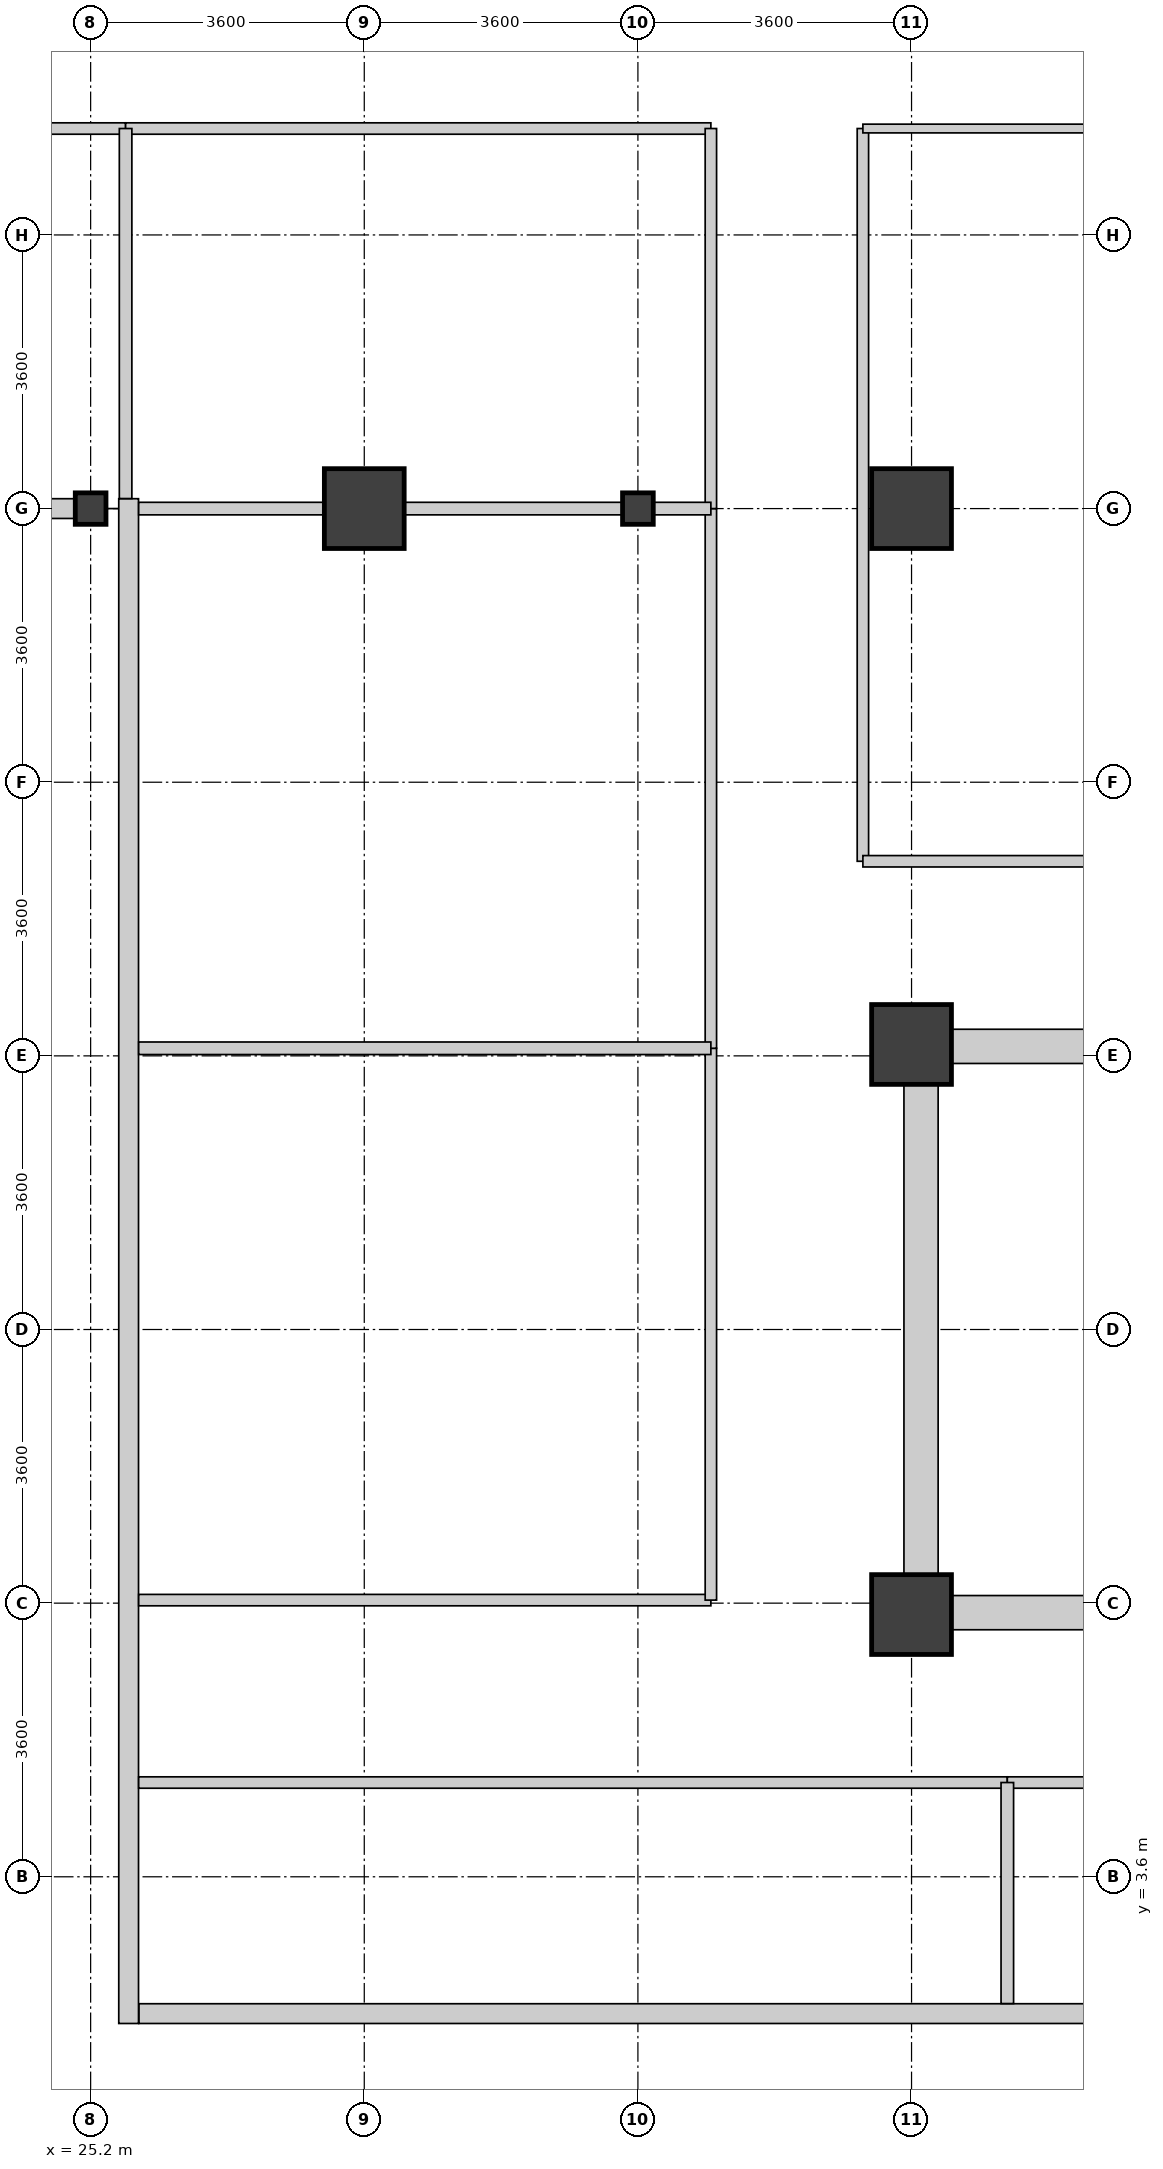
"""IFC4 building model, lengths in metres.
Left out: names, types, materials, properties, quantities, classifications, styles, units other than length and angle.
Written with IfcOpenShell. Run it as: python <this file> out.ifc"""

import sys

from ifc_helpers import new_model, si_unit, direction, frame, frame_2d, origin, origin_2d, place, context, subcontext, project, spatial, rectangle, i_section, extrude, source, transform, mapped, element, fill, save


model = new_model("IFC4")
c1 = context("Model", 3, precision=1e-05, world=origin(), true_north=direction((0.0, 1.0)))
c2 = subcontext(c1, "Body", "Model", "MODEL_VIEW")
j1 = project(units=[si_unit("LENGTHUNIT", "METRE"), si_unit("PLANEANGLEUNIT", "RADIAN")], contexts=[c1])
p1 = place(None, origin())
s1 = spatial("IfcSite", under=j1, at=p1, CompositionType="ELEMENT")
p2 = place(p1, origin())
s2 = spatial("IfcBuilding", under=s1, at=p2, CompositionType="ELEMENT")
p3 = place(p2, frame((0.0, 0.0, 135.6)))
s3 = spatial("IfcBuildingStorey", under=s2, at=p3, CompositionType="ELEMENT", Elevation=135.6)
p4 = place(p3, frame((36.125, 6.85, 0.0), z_axis=(0.0, 0.0, 1.0), x_axis=(0.0, 1.0, 0.0)))
e1 = element("IfcWall", 1, at=p4, inside=s3, PredefinedType="SHEAR", context=c2, shape_type="SweptSolid", body=[
    extrude(rectangle(XDim=7.9, YDim=0.45, at=frame_2d((3.95, 0.0))), origin(), (0.0, 0.0, 1.0), 4.36),
])
for number, where, z_axis, x_axis in (
    (2, (36.35, 7.075, 0.0), (0.0, 0.0, 1.0), (1.0, 0.0, 0.0)),
    (3, (36.35, 14.525, 0.0), (0.0, 0.0, 1.0), (1.0, 0.0, 0.0)),
):
    element("IfcWall", number, at=place(p3, frame(where, z_axis=z_axis, x_axis=x_axis)), inside=s3, PredefinedType="SHEAR", context=c2, shape_type="SweptSolid", body=[
        extrude(rectangle(XDim=3.2, YDim=0.45, at=frame_2d((1.6, 0.0))), origin(), (0.0, 0.0, 1.0), 4.36),
    ])
m1 = source(origin(), c2, "Body", "SweptSolid", [
    extrude(rectangle(XDim=1.05, YDim=1.05, at=origin_2d()), origin(), (0.0, 0.0, 1.0), 4.6),
])
for number, where, z_axis, x_axis in (
    (4, (28.8, 21.6, 0.0), (0.0, 0.0, 1.0), (1.0, 0.0, 0.0)),
    (5, (36.0, 21.6, 0.0), (0.0, 0.0, 1.0), (1.0, 0.0, 0.0)),
    (6, (36.0, 7.05, 0.0), (0.0, 0.0, 1.0), (1.0, 0.0, 0.0)),
    (7, (36.0, 14.55, 0.0), (0.0, 0.0, 1.0), (1.0, 0.0, 0.0)),
):
    element("IfcColumn", number, at=place(p3, frame(where, z_axis=z_axis, x_axis=x_axis)), inside=s3, PredefinedType="COLUMN", context=c2, shape_type="MappedRepresentation", body=[
        mapped(m1, transform((0.0, 0.0, 0.0), x_axis=(1.0, 0.0, 0.0), y_axis=(0.0, 1.0, 0.0), z_axis=(0.0, 0.0, 1.0), scale=1.0)),
    ])
m2 = source(origin(), c2, "Body", "SweptSolid", [
    extrude(i_section(OverallWidth=0.404, OverallDepth=0.414, WebThickness=0.021, FlangeThickness=0.028, FilletRadius=0.015, at=origin_2d()), origin(), (0.0, 0.0, 1.0), 4.6),
])
for number, where, z_axis, x_axis in (
    (8, (25.2, 21.6, 0.0), (0.0, 0.0, 1.0), (1.0, 0.0, 0.0)),
    (9, (32.4, 21.6, 0.0), (0.0, 0.0, 1.0), (1.0, 0.0, 0.0)),
):
    element("IfcColumn", number, at=place(p3, frame(where, z_axis=z_axis, x_axis=x_axis)), inside=s3, PredefinedType="COLUMN", context=c2, shape_type="MappedRepresentation", body=[
        mapped(m2, transform((0.0, 0.0, 0.0), x_axis=(1.0, 0.0, 0.0), y_axis=(0.0, 1.0, 0.0), z_axis=(0.0, 0.0, 1.0), scale=1.0)),
    ])
p5 = place(p3, frame((54.365, 1.8, 0.0), z_axis=(0.0, 0.0, 1.0), x_axis=(-1.0, 0.0, 0.0)))
e10 = element("IfcWall", 10, at=p5, inside=s3, PredefinedType="STANDARD", context=c2, shape_type="SweptSolid", body=[
    extrude(rectangle(XDim=28.53, YDim=0.26, at=frame_2d((14.265, 0.0))), origin(), (0.0, 0.0, 1.0), 4.34),
])
p6 = place(p5, frame((0.433, 0.0, 0.85)))
e11 = element("IfcOpeningElement", 11, at=p6, cuts=e10, PredefinedType="OPENING", context=c2, shape_type="SweptSolid", body=[
    extrude(rectangle(XDim=2.7, YDim=2.05, at=frame_2d((1.35, 1.025))), frame((0.0, 0.14, 0.0), z_axis=(0.0, -1.0, 0.0), x_axis=(1.0, 0.0, 0.0)), (0.0, 0.0, 1.0), 0.28),
])
p7 = place(p5, frame((7.566, 0.0, 0.85)))
e12 = element("IfcOpeningElement", 12, at=p7, cuts=e10, PredefinedType="OPENING", context=c2, shape_type="SweptSolid", body=[
    extrude(rectangle(XDim=2.7, YDim=2.05, at=frame_2d((1.35, 1.025))), frame((0.0, 0.14, 0.0), z_axis=(0.0, -1.0, 0.0), x_axis=(1.0, 0.0, 0.0)), (0.0, 0.0, 1.0), 0.28),
])
p8 = place(p5, frame((11.132, 0.0, 0.85)))
e13 = element("IfcOpeningElement", 13, at=p8, cuts=e10, PredefinedType="OPENING", context=c2, shape_type="SweptSolid", body=[
    extrude(rectangle(XDim=2.7, YDim=2.05, at=frame_2d((1.35, 1.025))), frame((0.0, 0.14, 0.0), z_axis=(0.0, -1.0, 0.0), x_axis=(1.0, 0.0, 0.0)), (0.0, 0.0, 1.0), 0.28),
])
p9 = place(p5, frame((18.264, 0.0, 0.85)))
e14 = element("IfcOpeningElement", 14, at=p9, cuts=e10, PredefinedType="OPENING", context=c2, shape_type="SweptSolid", body=[
    extrude(rectangle(XDim=2.7, YDim=2.05, at=frame_2d((1.35, 1.025))), frame((0.0, 0.14, 0.0), z_axis=(0.0, -1.0, 0.0), x_axis=(1.0, 0.0, 0.0)), (0.0, 0.0, 1.0), 0.28),
])
p10 = place(p5, frame((21.831, 0.0, 0.85)))
e15 = element("IfcOpeningElement", 15, at=p10, cuts=e10, PredefinedType="OPENING", context=c2, shape_type="SweptSolid", body=[
    extrude(rectangle(XDim=2.7, YDim=2.05, at=frame_2d((1.35, 1.025))), frame((0.0, 0.14, 0.0), z_axis=(0.0, -1.0, 0.0), x_axis=(1.0, 0.0, 0.0)), (0.0, 0.0, 1.0), 0.28),
])
p11 = place(p5, frame((25.397, 0.0, 0.85)))
e16 = element("IfcOpeningElement", 16, at=p11, cuts=e10, PredefinedType="OPENING", context=c2, shape_type="SweptSolid", body=[
    extrude(rectangle(XDim=2.7, YDim=2.05, at=frame_2d((1.35, 1.025))), frame((0.0, 0.14, 0.0), z_axis=(0.0, -1.0, 0.0), x_axis=(1.0, 0.0, 0.0)), (0.0, 0.0, 1.0), 0.28),
])
p12 = place(p3, frame((24.997, 21.6, 0.0), z_axis=(0.0, 0.0, 1.0), x_axis=(-1.0, 0.0, 0.0)))
e17 = element("IfcWall", 17, at=p12, inside=s3, PredefinedType="STANDARD", context=c2, shape_type="SweptSolid", body=[
    extrude(rectangle(XDim=2.871, YDim=0.26, at=frame_2d((1.436, 0.0))), origin(), (0.0, 0.0, 1.0), 3.89),
])
p13 = place(p12, frame((0.96, 0.0, 0.85)))
e18 = element("IfcOpeningElement", 18, at=p13, cuts=e17, PredefinedType="OPENING", context=c2, shape_type="SweptSolid", body=[
    extrude(rectangle(XDim=0.95, YDim=1.75, at=frame_2d((0.475, 0.875))), frame((0.0, 0.14, 0.0), z_axis=(0.0, -1.0, 0.0), x_axis=(1.0, 0.0, 0.0)), (0.0, 0.0, 1.0), 0.28),
])
p14 = place(p3, frame((25.7, 1.67, 0.0), z_axis=(0.0, 0.0, 1.0), x_axis=(0.0, 1.0, 0.0)))
e19 = element("IfcWall", 19, at=p14, inside=s3, PredefinedType="STANDARD", context=c2, shape_type="SweptSolid", body=[
    extrude(rectangle(XDim=20.06, YDim=0.26, at=frame_2d((10.03, 0.0))), origin(), (0.0, 0.0, 1.0), 4.34),
])
p15 = place(p14, frame((7.008, 0.0, 0.85)))
e20 = element("IfcOpeningElement", 20, at=p15, cuts=e19, PredefinedType="OPENING", context=c2, shape_type="SweptSolid", body=[
    extrude(rectangle(XDim=2.7, YDim=2.05, at=frame_2d((1.35, 1.025))), frame((0.0, 0.14, 0.0), z_axis=(0.0, -1.0, 0.0), x_axis=(1.0, 0.0, 0.0)), (0.0, 0.0, 1.0), 0.28),
])
p16 = place(p14, frame((13.695, 0.0, 0.85)))
e21 = element("IfcOpeningElement", 21, at=p16, cuts=e19, PredefinedType="OPENING", context=c2, shape_type="SweptSolid", body=[
    extrude(rectangle(XDim=2.7, YDim=2.05, at=frame_2d((1.35, 1.025))), frame((0.0, 0.14, 0.0), z_axis=(0.0, -1.0, 0.0), x_axis=(1.0, 0.0, 0.0)), (0.0, 0.0, 1.0), 0.28),
])
p17 = place(p3, frame((25.832, 4.84, 0.0), z_axis=(0.0, 0.0, 1.0), x_axis=(1.0, 0.0, 0.0)))
e22 = element("IfcWall", 22, at=p17, inside=s3, PredefinedType="PARTITIONING", context=c2, shape_type="SweptSolid", body=[
    extrude(rectangle(XDim=11.428, YDim=0.15, at=frame_2d((5.714, 0.0))), origin(), (0.0, 0.0, 1.0), 4.34),
])
p18 = place(p17, frame((5.064, 0.0, 0.0)))
e23 = element("IfcOpeningElement", 23, at=p18, cuts=e22, PredefinedType="OPENING", context=c2, shape_type="SweptSolid", body=[
    extrude(rectangle(XDim=1.3, YDim=2.12, at=frame_2d((0.65, 1.06))), frame((0.0, 0.085, 0.0), z_axis=(0.0, -1.0, 0.0), x_axis=(1.0, 0.0, 0.0)), (0.0, 0.0, 1.0), 0.17),
])
p19 = place(p3, frame((37.26, 4.84, 0.0), z_axis=(0.0, 0.0, 1.0), x_axis=(1.0, 0.0, 0.0)))
e24 = element("IfcWall", 24, at=p19, inside=s3, PredefinedType="PARTITIONING", context=c2, shape_type="SweptSolid", body=[
    extrude(rectangle(XDim=10.54, YDim=0.15, at=frame_2d((5.27, 0.0))), origin(), (0.0, 0.0, 1.0), 4.34),
])
p20 = place(p19, frame((4.82, 0.0, 0.0)))
e25 = element("IfcOpeningElement", 25, at=p20, cuts=e24, PredefinedType="OPENING", context=c2, shape_type="SweptSolid", body=[
    extrude(rectangle(XDim=0.9, YDim=2.08, at=frame_2d((0.45, 1.04))), frame((0.0, 0.085, 0.0), z_axis=(0.0, -1.0, 0.0), x_axis=(1.0, 0.0, 0.0)), (0.0, 0.0, 1.0), 0.17),
])
p21 = place(p3, frame((35.36, 16.96, 0.0), z_axis=(0.0, 0.0, 1.0), x_axis=(0.0, 1.0, 0.0)))
e26 = element("IfcWall", 26, at=p21, inside=s3, PredefinedType="PARTITIONING", context=c2, shape_type="SweptSolid", body=[
    extrude(rectangle(XDim=9.64, YDim=0.15, at=frame_2d((4.82, 0.0))), origin(), (0.0, 0.0, 1.0), 4.34),
])
p22 = place(p21, frame((2.435, 0.0, 0.0)))
e27 = element("IfcOpeningElement", 27, at=p22, cuts=e26, PredefinedType="OPENING", context=c2, shape_type="SweptSolid", body=[
    extrude(rectangle(XDim=1.3, YDim=2.12, at=frame_2d((0.65, 1.06))), frame((0.0, 0.085, 0.0), z_axis=(0.0, -1.0, 0.0), x_axis=(1.0, 0.0, 0.0)), (0.0, 0.0, 1.0), 0.17),
])
p23 = place(p3, frame((17.4, 26.6, 0.0), z_axis=(0.0, 0.0, 1.0), x_axis=(1.0, 0.0, 0.0)))
e28 = element("IfcWall", 28, at=p23, inside=s3, PredefinedType="PARTITIONING", context=c2, shape_type="SweptSolid", body=[
    extrude(rectangle(XDim=8.26, YDim=0.15, at=frame_2d((4.13, 0.0))), origin(), (0.0, 0.0, 1.0), 4.34),
])
p24 = place(p23, frame((3.655, 0.0, 0.0)))
e29 = element("IfcOpeningElement", 29, at=p24, cuts=e28, PredefinedType="OPENING", context=c2, shape_type="SweptSolid", body=[
    extrude(rectangle(XDim=0.95, YDim=2.1, at=frame_2d((0.475, 1.05))), frame((0.0, 0.085, 0.0), z_axis=(0.0, -1.0, 0.0), x_axis=(1.0, 0.0, 0.0)), (0.0, 0.0, 1.0), 0.17),
])
p25 = place(p3, frame((25.66, 26.6, 0.0), z_axis=(0.0, 0.0, 1.0), x_axis=(1.0, 0.0, 0.0)))
e30 = element("IfcWall", 30, at=p25, inside=s3, PredefinedType="PARTITIONING", context=c2, shape_type="SweptSolid", body=[
    extrude(rectangle(XDim=7.7, YDim=0.15, at=frame_2d((3.85, 0.0))), origin(), (0.0, 0.0, 1.0), 4.34),
])
p26 = place(p25, frame((3.2, 0.0, 0.0)))
e31 = element("IfcOpeningElement", 31, at=p26, cuts=e30, PredefinedType="OPENING", context=c2, shape_type="SweptSolid", body=[
    extrude(rectangle(XDim=1.3, YDim=2.12, at=frame_2d((0.65, 1.06))), frame((0.0, 0.085, 0.0), z_axis=(0.0, -1.0, 0.0), x_axis=(1.0, 0.0, 0.0)), (0.0, 0.0, 1.0), 0.17),
])
p27 = place(p3, frame((25.832, 7.24, 0.0), z_axis=(0.0, 0.0, 1.0), x_axis=(1.0, 0.0, 0.0)))
e32 = element("IfcWall", 32, at=p27, inside=s3, PredefinedType="PARTITIONING", context=c2, shape_type="SweptSolid", body=[
    extrude(rectangle(XDim=7.528, YDim=0.15, at=frame_2d((3.764, 0.0))), origin(), (0.0, 0.0, 1.0), 4.34),
])
p28 = place(p27, frame((3.114, 0.0, 0.0)))
e33 = element("IfcOpeningElement", 33, at=p28, cuts=e32, PredefinedType="OPENING", context=c2, shape_type="SweptSolid", body=[
    extrude(rectangle(XDim=1.3, YDim=2.12, at=frame_2d((0.65, 1.06))), frame((0.0, 0.085, 0.0), z_axis=(0.0, -1.0, 0.0), x_axis=(1.0, 0.0, 0.0)), (0.0, 0.0, 1.0), 0.17),
])
p29 = place(p3, frame((33.36, 7.24, 0.0), z_axis=(0.0, 0.0, 1.0), x_axis=(0.0, 1.0, 0.0)))
e34 = element("IfcWall", 34, at=p29, inside=s3, PredefinedType="PARTITIONING", context=c2, shape_type="SweptSolid", body=[
    extrude(rectangle(XDim=7.26, YDim=0.15, at=frame_2d((3.63, 0.0))), origin(), (0.0, 0.0, 1.0), 4.34),
])
p30 = place(p3, frame((33.36, 14.5, 0.0), z_axis=(0.0, 0.0, 1.0), x_axis=(0.0, 1.0, 0.0)))
e35 = element("IfcWall", 35, at=p30, inside=s3, PredefinedType="PARTITIONING", context=c2, shape_type="SweptSolid", body=[
    extrude(rectangle(XDim=7.1, YDim=0.15, at=frame_2d((3.55, 0.0))), origin(), (0.0, 0.0, 1.0), 4.34),
])
p31 = place(p30, frame((2.9, 0.0, 0.0)))
e36 = element("IfcOpeningElement", 36, at=p31, cuts=e35, PredefinedType="OPENING", context=c2, shape_type="SweptSolid", body=[
    extrude(rectangle(XDim=1.3, YDim=2.12, at=frame_2d((0.65, 1.06))), frame((0.0, 0.085, 0.0), z_axis=(0.0, -1.0, 0.0), x_axis=(1.0, 0.0, 0.0)), (0.0, 0.0, 1.0), 0.17),
])
p32 = place(p3, frame((35.36, 16.96, 0.0), z_axis=(0.0, 0.0, 1.0), x_axis=(1.0, 0.0, 0.0)))
e37 = element("IfcWall", 37, at=p32, inside=s3, PredefinedType="PARTITIONING", context=c2, shape_type="SweptSolid", body=[
    extrude(rectangle(XDim=5.82, YDim=0.15, at=frame_2d((2.91, 0.0))), origin(), (0.0, 0.0, 1.0), 4.34),
])
p33 = place(p3, frame((33.36, 21.6, 0.0), z_axis=(0.0, 0.0, 1.0), x_axis=(0.0, 1.0, 0.0)))
e38 = element("IfcWall", 38, at=p33, inside=s3, PredefinedType="PARTITIONING", context=c2, shape_type="SweptSolid", body=[
    extrude(rectangle(XDim=5.0, YDim=0.15, at=frame_2d((2.5, 0.0))), origin(), (0.0, 0.0, 1.0), 4.34),
])
p34 = place(p3, frame((25.832, 14.5, 0.0), z_axis=(0.0, 0.0, 1.0), x_axis=(1.0, 0.0, 0.0)))
e39 = element("IfcWall", 39, at=p34, inside=s3, PredefinedType="PARTITIONING", context=c2, shape_type="SweptSolid", body=[
    extrude(rectangle(XDim=7.528, YDim=0.165, at=frame_2d((3.764, 0.0))), origin(), (0.0, 0.0, 1.0), 4.34),
])
p35 = place(p3, frame((25.832, 21.6, 0.0), z_axis=(0.0, 0.0, 1.0), x_axis=(1.0, 0.0, 0.0)))
e40 = element("IfcWall", 40, at=p35, inside=s3, PredefinedType="PARTITIONING", context=c2, shape_type="SweptSolid", body=[
    extrude(rectangle(XDim=7.528, YDim=0.165, at=frame_2d((3.764, 0.0))), origin(), (0.0, 0.0, 1.0), 3.89),
])
p36 = place(p3, frame((35.36, 26.6, 0.0), z_axis=(0.0, 0.0, 1.0), x_axis=(1.0, 0.0, 0.0)))
e41 = element("IfcWall", 41, at=p36, inside=s3, PredefinedType="PARTITIONING", context=c2, shape_type="SweptSolid", body=[
    extrude(rectangle(XDim=5.82, YDim=0.115, at=frame_2d((2.91, 0.0))), origin(), (0.0, 0.0, 1.0), 4.34),
])
p37 = place(p3, frame((25.66, 21.732, 0.0), z_axis=(0.0, 0.0, 1.0), x_axis=(0.0, 1.0, 0.0)))
e42 = element("IfcWall", 42, at=p37, inside=s3, PredefinedType="PARTITIONING", context=c2, shape_type="SweptSolid", body=[
    extrude(rectangle(XDim=4.868, YDim=0.165, at=frame_2d((2.434, 0.0))), origin(), (0.0, 0.0, 1.0), 4.34),
])
p38 = place(p3, frame((37.26, 1.932, 0.0), z_axis=(0.0, 0.0, 1.0), x_axis=(0.0, 1.0, 0.0)))
e43 = element("IfcWall", 43, at=p38, inside=s3, PredefinedType="PARTITIONING", context=c2, shape_type="SweptSolid", body=[
    extrude(rectangle(XDim=2.908, YDim=0.165, at=frame_2d((1.454, 0.0))), origin(), (0.0, 0.0, 1.0), 4.34),
])
p39 = place(p9, origin())
e44 = element("IfcWindow", 44, at=p39, inside=s3, PartitioningType="SINGLE_PANEL", PredefinedType="WINDOW", context=c2, shape_type="SweptSolid", body=[
    extrude(rectangle(XDim=2.7, YDim=2.05, at=frame_2d((1.35, 1.025))), frame((0.0, 0.03, 0.0), z_axis=(0.0, -1.0, 0.0), x_axis=(1.0, 0.0, 0.0)), (0.0, 0.0, 1.0), 0.06),
])
fill(e14, e44)
p40 = place(p10, origin())
e45 = element("IfcWindow", 45, at=p40, inside=s3, PartitioningType="SINGLE_PANEL", PredefinedType="WINDOW", context=c2, shape_type="SweptSolid", body=[
    extrude(rectangle(XDim=2.7, YDim=2.05, at=frame_2d((1.35, 1.025))), frame((0.0, 0.03, 0.0), z_axis=(0.0, -1.0, 0.0), x_axis=(1.0, 0.0, 0.0)), (0.0, 0.0, 1.0), 0.06),
])
fill(e15, e45)
p41 = place(p11, origin())
e46 = element("IfcWindow", 46, at=p41, inside=s3, PartitioningType="SINGLE_PANEL", PredefinedType="WINDOW", context=c2, shape_type="SweptSolid", body=[
    extrude(rectangle(XDim=2.7, YDim=2.05, at=frame_2d((1.35, 1.025))), frame((0.0, 0.03, 0.0), z_axis=(0.0, -1.0, 0.0), x_axis=(1.0, 0.0, 0.0)), (0.0, 0.0, 1.0), 0.06),
])
fill(e16, e46)
p42 = place(p15, origin())
e47 = element("IfcWindow", 47, at=p42, inside=s3, PartitioningType="SINGLE_PANEL", PredefinedType="WINDOW", context=c2, shape_type="SweptSolid", body=[
    extrude(rectangle(XDim=2.7, YDim=2.05, at=frame_2d((1.35, 1.025))), frame((0.0, 0.03, 0.0), z_axis=(0.0, -1.0, 0.0), x_axis=(1.0, 0.0, 0.0)), (0.0, 0.0, 1.0), 0.06),
])
fill(e20, e47)
p43 = place(p16, origin())
e48 = element("IfcWindow", 48, at=p43, inside=s3, PartitioningType="SINGLE_PANEL", PredefinedType="WINDOW", context=c2, shape_type="SweptSolid", body=[
    extrude(rectangle(XDim=2.7, YDim=2.05, at=frame_2d((1.35, 1.025))), frame((0.0, 0.03, 0.0), z_axis=(0.0, -1.0, 0.0), x_axis=(1.0, 0.0, 0.0)), (0.0, 0.0, 1.0), 0.06),
])
fill(e21, e48)
p44 = place(p18, origin())
e49 = element("IfcDoor", 49, at=p44, inside=s3, OperationType="DOUBLE_DOOR_SINGLE_SWING", PredefinedType="DOOR", context=c2, shape_type="SweptSolid", body=[
    extrude(rectangle(XDim=1.3, YDim=2.12, at=frame_2d((0.65, 1.06))), frame((0.0, 0.025, 0.0), z_axis=(0.0, -1.0, 0.0), x_axis=(1.0, 0.0, 0.0)), (0.0, 0.0, 1.0), 0.05),
])
fill(e23, e49)
p45 = place(p22, origin())
e50 = element("IfcDoor", 50, at=p45, inside=s3, OperationType="DOUBLE_DOOR_SINGLE_SWING", PredefinedType="DOOR", context=c2, shape_type="SweptSolid", body=[
    extrude(rectangle(XDim=1.3, YDim=2.12, at=frame_2d((0.65, 1.06))), frame((0.0, 0.025, 0.0), z_axis=(0.0, -1.0, 0.0), x_axis=(1.0, 0.0, 0.0)), (0.0, 0.0, 1.0), 0.05),
])
fill(e27, e50)
p46 = place(p26, origin())
e51 = element("IfcDoor", 51, at=p46, inside=s3, OperationType="DOUBLE_DOOR_SINGLE_SWING", PredefinedType="DOOR", context=c2, shape_type="SweptSolid", body=[
    extrude(rectangle(XDim=1.3, YDim=2.12, at=frame_2d((0.65, 1.06))), frame((0.0, 0.025, 0.0), z_axis=(0.0, -1.0, 0.0), x_axis=(1.0, 0.0, 0.0)), (0.0, 0.0, 1.0), 0.05),
])
fill(e31, e51)
p47 = place(p28, origin())
e52 = element("IfcDoor", 52, at=p47, inside=s3, OperationType="DOUBLE_DOOR_SINGLE_SWING", PredefinedType="DOOR", context=c2, shape_type="SweptSolid", body=[
    extrude(rectangle(XDim=1.3, YDim=2.12, at=frame_2d((0.65, 1.06))), frame((0.0, 0.025, 0.0), z_axis=(0.0, -1.0, 0.0), x_axis=(1.0, 0.0, 0.0)), (0.0, 0.0, 1.0), 0.05),
])
fill(e33, e52)
p48 = place(p31, origin())
e53 = element("IfcDoor", 53, at=p48, inside=s3, OperationType="DOUBLE_DOOR_SINGLE_SWING", PredefinedType="DOOR", context=c2, shape_type="SweptSolid", body=[
    extrude(rectangle(XDim=1.3, YDim=2.12, at=frame_2d((0.65, 1.06))), frame((0.0, 0.025, 0.0), z_axis=(0.0, -1.0, 0.0), x_axis=(1.0, 0.0, 0.0)), (0.0, 0.0, 1.0), 0.05),
])
fill(e36, e53)
save(model, sys.argv[1])
